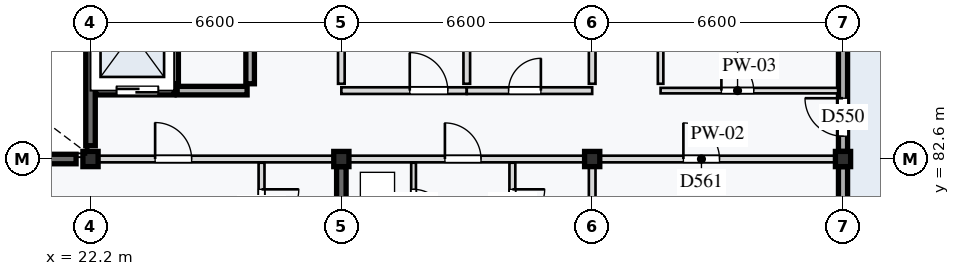
"""IFC4 building model, lengths in metres.
Left out: names, types, materials, properties, quantities, classifications, styles, units other than length and angle.
Written with IfcOpenShell. Run it as: python <this file> out.ifc"""

import sys

from ifc_helpers import new_model, si_unit, direction, frame, frame_2d, origin, origin_2d, place, context, subcontext, project, spatial, rectangle, extrude, element, fill, save


model = new_model("IFC4")
c1 = context("Model", 3, precision=1e-05, world=origin(), true_north=direction((0.0, 1.0)))
c2 = subcontext(c1, "Body", "Model", "MODEL_VIEW")
j1 = project(units=[si_unit("LENGTHUNIT", "METRE"), si_unit("PLANEANGLEUNIT", "RADIAN")], contexts=[c1])
p1 = place(None, origin())
s1 = spatial("IfcSite", under=j1, at=p1, CompositionType="ELEMENT")
p2 = place(p1, origin())
s2 = spatial("IfcBuilding", under=s1, at=p2, CompositionType="ELEMENT")
p3 = place(p2, frame((0.0, 0.0, 56.4)))
s3 = spatial("IfcBuildingStorey", under=s2, at=p3, CompositionType="ELEMENT", Elevation=56.4)
for number, where, z_axis, x_axis in (
    (1, (22.2, 82.6, 0.0), (0.0, 0.0, 1.0), (1.0, 0.0, 0.0)),
    (2, (28.8, 82.6, 0.0), (0.0, 0.0, 1.0), (1.0, 0.0, 0.0)),
    (3, (35.4, 82.6, 0.0), (0.0, 0.0, 1.0), (1.0, 0.0, 0.0)),
    (4, (42.0, 82.6, 0.0), (0.0, 0.0, 1.0), (1.0, 0.0, 0.0)),
):
    element("IfcColumn", number, at=place(p3, frame(where, z_axis=z_axis, x_axis=x_axis)), inside=s3, PredefinedType="COLUMN", context=c2, shape_type="SweptSolid", body=[
        extrude(rectangle(XDim=0.4, YDim=0.4, at=origin_2d()), origin(), (0.0, 0.0, 1.0), 3.2),
    ])
p4 = place(p3, frame((15.98, 82.6, 0.0), z_axis=(0.0, 0.0, 1.0), x_axis=(1.0, 0.0, 0.0)))
e5 = element("IfcWall", 5, at=p4, inside=s3, PredefinedType="SHEAR", context=c2, shape_type="SweptSolid", body=[
    extrude(rectangle(XDim=5.84, YDim=0.25, at=frame_2d((2.92, 0.0))), origin(), (0.0, 0.0, 1.0), 2.93),
])
p5 = place(p3, frame((22.2, 82.95, 0.0), z_axis=(0.0, 0.0, 1.0), x_axis=(0.0, 1.0, 0.0)))
e6 = element("IfcWall", 6, at=p5, inside=s3, PredefinedType="SHEAR", context=c2, shape_type="SweptSolid", body=[
    extrude(rectangle(XDim=2.8, YDim=0.25, at=frame_2d((1.4, 0.0))), origin(), (0.0, 0.0, 1.0), 2.93),
])
p6 = place(p3, frame((28.8, 76.2, 0.0), z_axis=(0.0, 0.0, 1.0), x_axis=(0.0, 1.0, 0.0)))
e7 = element("IfcWall", 7, at=p6, inside=s3, PredefinedType="SHEAR", context=c2, shape_type="SweptSolid", body=[
    extrude(rectangle(XDim=6.2, YDim=0.25, at=frame_2d((3.1, 0.0))), origin(), (0.0, 0.0, 1.0), 2.93),
])
p7 = place(p3, frame((42.0, 76.2, 0.0), z_axis=(0.0, 0.0, 1.0), x_axis=(0.0, 1.0, 0.0)))
e8 = element("IfcWall", 8, at=p7, inside=s3, PredefinedType="STANDARD", context=c2, shape_type="SweptSolid", body=[
    extrude(rectangle(XDim=6.2, YDim=0.24, at=frame_2d((3.1, 0.0))), origin(), (0.0, 0.0, 1.0), 2.65),
])
p8 = place(p3, frame((42.0, 82.8, 0.0), z_axis=(0.0, 0.0, 1.0), x_axis=(0.0, 1.0, 0.0)))
e9 = element("IfcWall", 9, at=p8, inside=s3, PredefinedType="STANDARD", context=c2, shape_type="SweptSolid", body=[
    extrude(rectangle(XDim=3.15, YDim=0.24, at=frame_2d((1.575, 0.0))), origin(), (0.0, 0.0, 1.0), 2.65),
])
p9 = place(p8, frame((0.4, 0.0, 0.0)))
e10 = element("IfcOpeningElement", 10, at=p9, cuts=e9, PredefinedType="OPENING", context=c2, shape_type="SweptSolid", body=[
    extrude(rectangle(XDim=1.0, YDim=2.15, at=frame_2d((0.5, 1.075))), frame((0.0, 0.13, 0.0), z_axis=(0.0, -1.0, 0.0), x_axis=(1.0, 0.0, 0.0)), (0.0, 0.0, 1.0), 0.26),
])
p10 = place(p3, frame((22.335, 84.4, 0.0), z_axis=(0.0, 0.0, 1.0), x_axis=(1.0, 0.0, 0.0)))
e11 = element("IfcWall", 11, at=p10, inside=s3, PredefinedType="STANDARD", context=c2, shape_type="SweptSolid", body=[
    extrude(rectangle(XDim=2.065, YDim=0.225, at=frame_2d((1.032, 0.0))), origin(), (0.0, 0.0, 1.0), 2.93),
])
p11 = place(p10, frame((0.55, 0.0, 0.0)))
e12 = element("IfcOpeningElement", 12, at=p11, cuts=e11, PredefinedType="OPENING", context=c2, shape_type="SweptSolid", body=[
    extrude(rectangle(XDim=1.1, YDim=2.1, at=frame_2d((0.55, 1.05))), frame((0.0, 0.123, 0.0), z_axis=(0.0, -1.0, 0.0), x_axis=(1.0, 0.0, 0.0)), (0.0, 0.0, 1.0), 0.245),
])
p12 = place(p3, frame((24.48, 84.4, 0.0), z_axis=(0.0, 0.0, 1.0), x_axis=(1.0, 0.0, 0.0)))
e13 = element("IfcWall", 13, at=p12, inside=s3, PredefinedType="STANDARD", context=c2, shape_type="SweptSolid", body=[
    extrude(rectangle(XDim=1.84, YDim=0.225, at=frame_2d((0.92, 0.0))), origin(), (0.0, 0.0, 1.0), 2.93),
])
for number, where, z_axis, x_axis in (
    (14, (24.4, 84.58, 0.0), (0.0, 0.0, 1.0), (0.0, 1.0, 0.0)),
    (15, (26.4, 84.58, 0.0), (0.0, 0.0, 1.0), (0.0, 1.0, 0.0)),
):
    element("IfcWall", number, at=place(p3, frame(where, z_axis=z_axis, x_axis=x_axis)), inside=s3, PredefinedType="STANDARD", context=c2, shape_type="SweptSolid", body=[
        extrude(rectangle(XDim=2.64, YDim=0.225, at=frame_2d((1.32, 0.0))), origin(), (0.0, 0.0, 1.0), 2.93),
    ])
p13 = place(p3, frame((28.8, 84.4, 0.0), z_axis=(0.0, 0.0, 1.0), x_axis=(1.0, 0.0, 0.0)))
e16 = element("IfcWall", 16, at=p13, inside=s3, PredefinedType="PARTITIONING", context=c2, shape_type="SweptSolid", body=[
    extrude(rectangle(XDim=3.3, YDim=0.175, at=frame_2d((1.65, 0.0))), origin(), (0.0, 0.0, 1.0), 2.93),
])
p14 = place(p13, frame((1.8, 0.0, 0.0)))
e17 = element("IfcOpeningElement", 17, at=p14, cuts=e16, PredefinedType="OPENING", context=c2, shape_type="SweptSolid", body=[
    extrude(rectangle(XDim=1.0, YDim=2.16, at=frame_2d((0.5, 1.08))), frame((0.0, 0.097, 0.0), z_axis=(0.0, -1.0, 0.0), x_axis=(1.0, 0.0, 0.0)), (0.0, 0.0, 1.0), 0.195),
])
p15 = place(p3, frame((32.1, 84.4, 0.0), z_axis=(0.0, 0.0, 1.0), x_axis=(1.0, 0.0, 0.0)))
e18 = element("IfcWall", 18, at=p15, inside=s3, PredefinedType="PARTITIONING", context=c2, shape_type="SweptSolid", body=[
    extrude(rectangle(XDim=3.3, YDim=0.175, at=frame_2d((1.65, 0.0))), origin(), (0.0, 0.0, 1.0), 2.93),
])
p16 = place(p15, frame((1.1, 0.0, 0.0)))
e19 = element("IfcOpeningElement", 19, at=p16, cuts=e18, PredefinedType="OPENING", context=c2, shape_type="SweptSolid", body=[
    extrude(rectangle(XDim=0.85, YDim=2.0, at=frame_2d((0.425, 1.0))), frame((0.0, 0.097, 0.0), z_axis=(0.0, -1.0, 0.0), x_axis=(1.0, 0.0, 0.0)), (0.0, 0.0, 1.0), 0.195),
])
for number, where, z_axis, x_axis in (
    (20, (28.8, 84.58, 0.0), (0.0, 0.0, 1.0), (0.0, 1.0, 0.0)),
    (21, (32.1, 84.58, 0.0), (0.0, 0.0, 1.0), (0.0, 1.0, 0.0)),
    (22, (35.4, 84.58, 0.0), (0.0, 0.0, 1.0), (0.0, 1.0, 0.0)),
):
    element("IfcWall", number, at=place(p3, frame(where, z_axis=z_axis, x_axis=x_axis)), inside=s3, PredefinedType="PARTITIONING", context=c2, shape_type="SweptSolid", body=[
        extrude(rectangle(XDim=1.14, YDim=0.175, at=frame_2d((0.57, 0.0))), origin(), (0.0, 0.0, 1.0), 2.93),
    ])
p17 = place(p3, frame((37.2, 84.4, 0.0), z_axis=(0.0, 0.0, 1.0), x_axis=(1.0, 0.0, 0.0)))
e23 = element("IfcWall", 23, at=p17, inside=s3, PredefinedType="PARTITIONING", context=c2, shape_type="SweptSolid", body=[
    extrude(rectangle(XDim=4.67, YDim=0.145, at=frame_2d((2.335, 0.0))), origin(), (0.0, 0.0, 1.0), 2.93),
])
p18 = place(p17, frame((1.6, 0.0, 0.0)))
e24 = element("IfcOpeningElement", 24, at=p18, cuts=e23, PredefinedType="OPENING", context=c2, shape_type="SweptSolid", body=[
    extrude(rectangle(XDim=0.85, YDim=2.1, at=frame_2d((0.425, 1.05))), frame((0.0, 0.083, 0.0), z_axis=(0.0, -1.0, 0.0), x_axis=(1.0, 0.0, 0.0)), (0.0, 0.0, 1.0), 0.165),
])
p19 = place(p3, frame((37.2, 84.58, 0.0), z_axis=(0.0, 0.0, 1.0), x_axis=(0.0, 1.0, 0.0)))
e25 = element("IfcWall", 25, at=p19, inside=s3, PredefinedType="PARTITIONING", context=c2, shape_type="SweptSolid", body=[
    extrude(rectangle(XDim=2.64, YDim=0.145, at=frame_2d((1.32, 0.0))), origin(), (0.0, 0.0, 1.0), 2.93),
])
p20 = place(p3, frame((22.2, 82.6, 0.0), z_axis=(0.0, 0.0, 1.0), x_axis=(1.0, 0.0, 0.0)))
e26 = element("IfcWall", 26, at=p20, inside=s3, PredefinedType="PARTITIONING", context=c2, shape_type="SweptSolid", body=[
    extrude(rectangle(XDim=6.6, YDim=0.175, at=frame_2d((3.3, 0.0))), origin(), (0.0, 0.0, 1.0), 2.55),
])
p21 = place(p20, frame((1.7, 0.0, 0.0)))
e27 = element("IfcOpeningElement", 27, at=p21, cuts=e26, PredefinedType="OPENING", context=c2, shape_type="SweptSolid", body=[
    extrude(rectangle(XDim=0.96, YDim=2.18, at=frame_2d((0.48, 1.09))), frame((0.0, 0.097, 0.0), z_axis=(0.0, -1.0, 0.0), x_axis=(1.0, 0.0, 0.0)), (0.0, 0.0, 1.0), 0.195),
])
p22 = place(p3, frame((26.7, 82.502, 0.0), z_axis=(0.0, 0.0, 1.0), x_axis=(0.0, -1.0, 0.0)))
e28 = element("IfcWall", 28, at=p22, inside=s3, PredefinedType="PARTITIONING", context=c2, shape_type="SweptSolid", body=[
    extrude(rectangle(XDim=2.302, YDim=0.155, at=frame_2d((1.151, 0.0))), origin(), (0.0, 0.0, 1.0), 2.93),
])
p23 = place(p22, frame((0.7, 0.0, 0.0)))
e29 = element("IfcOpeningElement", 29, at=p23, cuts=e28, PredefinedType="OPENING", context=c2, shape_type="SweptSolid", body=[
    extrude(rectangle(XDim=0.98, YDim=2.12, at=frame_2d((0.49, 1.06))), frame((0.0, 0.087, 0.0), z_axis=(0.0, -1.0, 0.0), x_axis=(1.0, 0.0, 0.0)), (0.0, 0.0, 1.0), 0.175),
])
p24 = place(p3, frame((28.8, 82.6, 0.0), z_axis=(0.0, 0.0, 1.0), x_axis=(1.0, 0.0, 0.0)))
e30 = element("IfcWall", 30, at=p24, inside=s3, PredefinedType="PARTITIONING", context=c2, shape_type="SweptSolid", body=[
    extrude(rectangle(XDim=6.6, YDim=0.175, at=frame_2d((3.3, 0.0))), origin(), (0.0, 0.0, 1.0), 2.55),
])
p25 = place(p24, frame((2.725, 0.0, 0.0)))
e31 = element("IfcOpeningElement", 31, at=p25, cuts=e30, PredefinedType="OPENING", context=c2, shape_type="SweptSolid", body=[
    extrude(rectangle(XDim=0.95, YDim=2.16, at=frame_2d((0.475, 1.08))), frame((0.0, 0.097, 0.0), z_axis=(0.0, -1.0, 0.0), x_axis=(1.0, 0.0, 0.0)), (0.0, 0.0, 1.0), 0.195),
])
p26 = place(p3, frame((30.7, 82.502, 0.0), z_axis=(0.0, 0.0, 1.0), x_axis=(0.0, -1.0, 0.0)))
e32 = element("IfcWall", 32, at=p26, inside=s3, PredefinedType="PARTITIONING", context=c2, shape_type="SweptSolid", body=[
    extrude(rectangle(XDim=2.302, YDim=0.125, at=frame_2d((1.151, 0.0))), origin(), (0.0, 0.0, 1.0), 2.93),
])
p27 = place(p26, frame((0.7, 0.0, 0.0)))
e33 = element("IfcOpeningElement", 33, at=p27, cuts=e32, PredefinedType="OPENING", context=c2, shape_type="SweptSolid", body=[
    extrude(rectangle(XDim=0.84, YDim=2.06, at=frame_2d((0.42, 1.03))), frame((0.0, 0.073, 0.0), z_axis=(0.0, -1.0, 0.0), x_axis=(1.0, 0.0, 0.0)), (0.0, 0.0, 1.0), 0.145),
])
p28 = place(p3, frame((33.3, 82.502, 0.0), z_axis=(0.0, 0.0, 1.0), x_axis=(0.0, -1.0, 0.0)))
e34 = element("IfcWall", 34, at=p28, inside=s3, PredefinedType="PARTITIONING", context=c2, shape_type="SweptSolid", body=[
    extrude(rectangle(XDim=2.302, YDim=0.155, at=frame_2d((1.151, 0.0))), origin(), (0.0, 0.0, 1.0), 2.93),
])
p29 = place(p28, frame((0.7, 0.0, 0.0)))
e35 = element("IfcOpeningElement", 35, at=p29, cuts=e34, PredefinedType="OPENING", context=c2, shape_type="SweptSolid", body=[
    extrude(rectangle(XDim=0.85, YDim=2.1, at=frame_2d((0.425, 1.05))), frame((0.0, 0.087, 0.0), z_axis=(0.0, -1.0, 0.0), x_axis=(1.0, 0.0, 0.0)), (0.0, 0.0, 1.0), 0.175),
])
p30 = place(p3, frame((35.4, 82.42, 0.0), z_axis=(0.0, 0.0, 1.0), x_axis=(0.0, -1.0, 0.0)))
e36 = element("IfcWall", 36, at=p30, inside=s3, PredefinedType="PARTITIONING", context=c2, shape_type="SweptSolid", body=[
    extrude(rectangle(XDim=2.132, YDim=0.175, at=frame_2d((1.066, 0.0))), origin(), (0.0, 0.0, 1.0), 2.93),
])
p31 = place(p3, frame((35.4, 82.6, 0.0), z_axis=(0.0, 0.0, 1.0), x_axis=(1.0, 0.0, 0.0)))
e37 = element("IfcWall", 37, at=p31, inside=s3, PredefinedType="PARTITIONING", context=c2, shape_type="SweptSolid", body=[
    extrude(rectangle(XDim=6.6, YDim=0.175, at=frame_2d((3.3, 0.0))), origin(), (0.0, 0.0, 1.0), 2.55),
])
p32 = place(p31, frame((2.4, 0.0, 0.0)))
e38 = element("IfcOpeningElement", 38, at=p32, cuts=e37, PredefinedType="OPENING", context=c2, shape_type="SweptSolid", body=[
    extrude(rectangle(XDim=0.95, YDim=2.16, at=frame_2d((0.475, 1.08))), frame((0.0, 0.097, 0.0), z_axis=(0.0, -1.0, 0.0), x_axis=(1.0, 0.0, 0.0)), (0.0, 0.0, 1.0), 0.195),
])
p33 = place(p9, origin())
e39 = element("IfcDoor", 39, at=p33, inside=s3, OperationType="SINGLE_SWING_RIGHT", PredefinedType="DOOR", context=c2, shape_type="SweptSolid", body=[
    extrude(rectangle(XDim=1.0, YDim=2.15, at=frame_2d((0.5, 1.075))), frame((0.0, 0.025, 0.0), z_axis=(0.0, -1.0, 0.0), x_axis=(1.0, 0.0, 0.0)), (0.0, 0.0, 1.0), 0.05),
])
fill(e10, e39)
p34 = place(p11, origin())
e40 = element("IfcDoor", 40, at=p34, inside=s3, OperationType="DOUBLE_DOOR_SLIDING", PredefinedType="DOOR", context=c2, shape_type="SweptSolid", body=[
    extrude(rectangle(XDim=1.1, YDim=2.1, at=frame_2d((0.55, 1.05))), frame((0.0, 0.025, 0.0), z_axis=(0.0, -1.0, 0.0), x_axis=(1.0, 0.0, 0.0)), (0.0, 0.0, 1.0), 0.05),
])
fill(e12, e40)
p35 = place(p14, origin())
e41 = element("IfcDoor", 41, at=p35, inside=s3, OperationType="SINGLE_SWING_LEFT", PredefinedType="DOOR", context=c2, shape_type="SweptSolid", body=[
    extrude(rectangle(XDim=1.0, YDim=2.16, at=frame_2d((0.5, 1.08))), frame((0.0, 0.025, 0.0), z_axis=(0.0, -1.0, 0.0), x_axis=(1.0, 0.0, 0.0)), (0.0, 0.0, 1.0), 0.05),
])
fill(e17, e41)
p36 = place(p16, origin())
e42 = element("IfcDoor", 42, at=p36, inside=s3, OperationType="SINGLE_SWING_RIGHT", PredefinedType="DOOR", context=c2, shape_type="SweptSolid", body=[
    extrude(rectangle(XDim=0.85, YDim=2.0, at=frame_2d((0.425, 1.0))), frame((0.0, 0.025, 0.0), z_axis=(0.0, -1.0, 0.0), x_axis=(1.0, 0.0, 0.0)), (0.0, 0.0, 1.0), 0.05),
])
fill(e19, e42)
p37 = place(p18, origin())
e43 = element("IfcDoor", 43, at=p37, inside=s3, OperationType="SINGLE_SWING_LEFT", PredefinedType="DOOR", context=c2, shape_type="SweptSolid", body=[
    extrude(rectangle(XDim=0.85, YDim=2.1, at=frame_2d((0.425, 1.05))), frame((0.0, 0.025, 0.0), z_axis=(0.0, -1.0, 0.0), x_axis=(1.0, 0.0, 0.0)), (0.0, 0.0, 1.0), 0.05),
])
fill(e24, e43)
p38 = place(p21, origin())
e44 = element("IfcDoor", 44, at=p38, inside=s3, OperationType="SINGLE_SWING_LEFT", PredefinedType="DOOR", context=c2, shape_type="SweptSolid", body=[
    extrude(rectangle(XDim=0.96, YDim=2.18, at=frame_2d((0.48, 1.09))), frame((0.0, 0.025, 0.0), z_axis=(0.0, -1.0, 0.0), x_axis=(1.0, 0.0, 0.0)), (0.0, 0.0, 1.0), 0.05),
])
fill(e27, e44)
p39 = place(p23, origin())
e45 = element("IfcDoor", 45, at=p39, inside=s3, OperationType="SINGLE_SWING_LEFT", PredefinedType="DOOR", context=c2, shape_type="SweptSolid", body=[
    extrude(rectangle(XDim=0.98, YDim=2.12, at=frame_2d((0.49, 1.06))), frame((0.0, 0.025, 0.0), z_axis=(0.0, -1.0, 0.0), x_axis=(1.0, 0.0, 0.0)), (0.0, 0.0, 1.0), 0.05),
])
fill(e29, e45)
p40 = place(p25, origin())
e46 = element("IfcDoor", 46, at=p40, inside=s3, OperationType="SINGLE_SWING_LEFT", PredefinedType="DOOR", context=c2, shape_type="SweptSolid", body=[
    extrude(rectangle(XDim=0.95, YDim=2.16, at=frame_2d((0.475, 1.08))), frame((0.0, 0.025, 0.0), z_axis=(0.0, -1.0, 0.0), x_axis=(1.0, 0.0, 0.0)), (0.0, 0.0, 1.0), 0.05),
])
fill(e31, e46)
p41 = place(p27, origin())
e47 = element("IfcDoor", 47, at=p41, inside=s3, OperationType="SINGLE_SWING_RIGHT", PredefinedType="DOOR", context=c2, shape_type="SweptSolid", body=[
    extrude(rectangle(XDim=0.84, YDim=2.06, at=frame_2d((0.42, 1.03))), frame((0.0, 0.025, 0.0), z_axis=(0.0, -1.0, 0.0), x_axis=(1.0, 0.0, 0.0)), (0.0, 0.0, 1.0), 0.05),
])
fill(e33, e47)
p42 = place(p29, origin())
e48 = element("IfcDoor", 48, at=p42, inside=s3, OperationType="SINGLE_SWING_LEFT", PredefinedType="DOOR", context=c2, shape_type="SweptSolid", body=[
    extrude(rectangle(XDim=0.85, YDim=2.1, at=frame_2d((0.425, 1.05))), frame((0.0, 0.025, 0.0), z_axis=(0.0, -1.0, 0.0), x_axis=(1.0, 0.0, 0.0)), (0.0, 0.0, 1.0), 0.05),
])
fill(e35, e48)
p43 = place(p32, origin())
e49 = element("IfcDoor", 49, at=p43, inside=s3, OperationType="SINGLE_SWING_LEFT", PredefinedType="DOOR", context=c2, shape_type="SweptSolid", body=[
    extrude(rectangle(XDim=0.95, YDim=2.16, at=frame_2d((0.475, 1.08))), frame((0.0, 0.025, 0.0), z_axis=(0.0, -1.0, 0.0), x_axis=(1.0, 0.0, 0.0)), (0.0, 0.0, 1.0), 0.05),
])
fill(e38, e49)
save(model, sys.argv[1])
